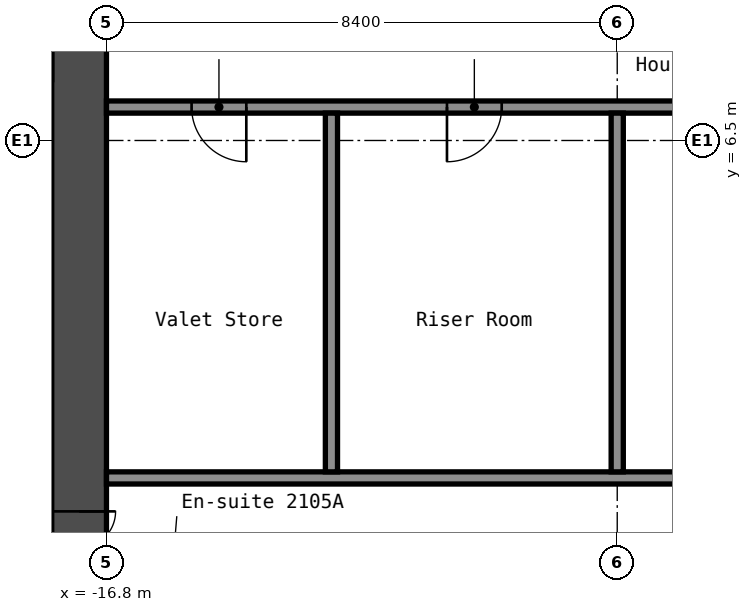
"""IFC4 building model, lengths in metres.
Left out: names, types, materials, properties, quantities, classifications, styles, units other than length and angle.
Written with IfcOpenShell. Run it as: python <this file> out.ifc"""

import sys

from ifc_helpers import new_model, si_unit, direction, frame, frame_2d, origin, place, context, subcontext, project, spatial, rectangle, extrude, element, fill, save


model = new_model("IFC4")
c1 = context("Model", 3, precision=1e-05, world=origin(), true_north=direction((0.0, 1.0)))
c2 = subcontext(c1, "Body", "Model", "MODEL_VIEW")
j1 = project(units=[si_unit("LENGTHUNIT", "METRE"), si_unit("PLANEANGLEUNIT", "RADIAN")], contexts=[c1])
p1 = place(None, origin())
s1 = spatial("IfcSite", under=j1, at=p1, CompositionType="ELEMENT")
p2 = place(p1, origin())
s2 = spatial("IfcBuilding", under=s1, at=p2, CompositionType="ELEMENT")
p3 = place(p2, frame((0.0, 0.0, 78.6)))
s3 = spatial("IfcBuildingStorey", under=s2, at=p3, CompositionType="ELEMENT", Elevation=78.6)
p4 = place(p3, frame((-17.25, -8.4, 0.0), z_axis=(0.0, 0.0, 1.0), x_axis=(0.0, 1.0, 0.0)))
e1 = element("IfcWall", 1, at=p4, inside=s3, PredefinedType="SHEAR", context=c2, shape_type="SweptSolid", body=[
    extrude(rectangle(XDim=16.8, YDim=0.9, at=frame_2d((8.4, 0.0))), origin(), (0.0, 0.0, 1.0), 2.8),
])
p5 = place(p4, frame((7.6, 0.0, 0.0)))
e2 = element("IfcOpeningElement", 2, at=p5, cuts=e1, PredefinedType="OPENING", context=c2, shape_type="SweptSolid", body=[
    extrude(rectangle(XDim=1.2, YDim=2.1, at=frame_2d((0.6, 1.05))), frame((0.0, 0.46, 0.0), z_axis=(0.0, -1.0, 0.0), x_axis=(1.0, 0.0, 0.0)), (0.0, 0.0, 1.0), 0.92),
])
p6 = place(p3, frame((-16.8, 0.95, 0.0), z_axis=(0.0, 0.0, 1.0), x_axis=(1.0, 0.0, 0.0)))
e3 = element("IfcWall", 3, at=p6, inside=s3, PredefinedType="PARTITIONING", context=c2, shape_type="SweptSolid", body=[
    extrude(rectangle(XDim=33.6, YDim=0.2, at=frame_2d((16.8, 0.0))), origin(), (0.0, 0.0, 1.0), 2.8),
])
p7 = place(p6, frame((9.88, 0.0, 0.0)))
e4 = element("IfcOpeningElement", 4, at=p7, cuts=e3, PredefinedType="OPENING", context=c2, shape_type="SweptSolid", body=[
    extrude(rectangle(XDim=0.9, YDim=2.1, at=frame_2d((0.45, 1.05))), frame((0.0, 0.11, 0.0), z_axis=(0.0, -1.0, 0.0), x_axis=(1.0, 0.0, 0.0)), (0.0, 0.0, 1.0), 0.22),
])
p8 = place(p6, frame((14.08, 0.0, 0.0)))
e5 = element("IfcOpeningElement", 5, at=p8, cuts=e3, PredefinedType="OPENING", context=c2, shape_type="SweptSolid", body=[
    extrude(rectangle(XDim=0.9, YDim=2.1, at=frame_2d((0.45, 1.05))), frame((0.0, 0.11, 0.0), z_axis=(0.0, -1.0, 0.0), x_axis=(1.0, 0.0, 0.0)), (0.0, 0.0, 1.0), 0.22),
])
p9 = place(p6, frame((26.26, 0.0, 0.0)))
e6 = element("IfcOpeningElement", 6, at=p9, cuts=e3, PredefinedType="OPENING", context=c2, shape_type="SweptSolid", body=[
    extrude(rectangle(XDim=0.9, YDim=2.1, at=frame_2d((0.45, 1.05))), frame((0.0, 0.11, 0.0), z_axis=(0.0, -1.0, 0.0), x_axis=(1.0, 0.0, 0.0)), (0.0, 0.0, 1.0), 0.22),
])
p10 = place(p6, frame((30.46, 0.0, 0.0)))
e7 = element("IfcOpeningElement", 7, at=p10, cuts=e3, PredefinedType="OPENING", context=c2, shape_type="SweptSolid", body=[
    extrude(rectangle(XDim=0.9, YDim=2.1, at=frame_2d((0.45, 1.05))), frame((0.0, 0.11, 0.0), z_axis=(0.0, -1.0, 0.0), x_axis=(1.0, 0.0, 0.0)), (0.0, 0.0, 1.0), 0.22),
])
p11 = place(p3, frame((-16.8, 7.05, 0.0), z_axis=(0.0, 0.0, 1.0), x_axis=(1.0, 0.0, 0.0)))
e8 = element("IfcWall", 8, at=p11, inside=s3, PredefinedType="PARTITIONING", context=c2, shape_type="SweptSolid", body=[
    extrude(rectangle(XDim=33.6, YDim=0.2, at=frame_2d((16.8, 0.0))), origin(), (0.0, 0.0, 1.0), 2.8),
])
p12 = place(p11, frame((1.4, 0.0, 0.0)))
e9 = element("IfcOpeningElement", 9, at=p12, cuts=e8, PredefinedType="OPENING", context=c2, shape_type="SweptSolid", body=[
    extrude(rectangle(XDim=0.9, YDim=2.1, at=frame_2d((0.45, 1.05))), frame((0.0, 0.11, 0.0), z_axis=(0.0, -1.0, 0.0), x_axis=(1.0, 0.0, 0.0)), (0.0, 0.0, 1.0), 0.22),
])
p13 = place(p11, frame((5.6, 0.0, 0.0)))
e10 = element("IfcOpeningElement", 10, at=p13, cuts=e8, PredefinedType="OPENING", context=c2, shape_type="SweptSolid", body=[
    extrude(rectangle(XDim=0.9, YDim=2.1, at=frame_2d((0.45, 1.05))), frame((0.0, 0.11, 0.0), z_axis=(0.0, -1.0, 0.0), x_axis=(1.0, 0.0, 0.0)), (0.0, 0.0, 1.0), 0.22),
])
p14 = place(p11, frame((19.04, 0.0, 0.0)))
e11 = element("IfcOpeningElement", 11, at=p14, cuts=e8, PredefinedType="OPENING", context=c2, shape_type="SweptSolid", body=[
    extrude(rectangle(XDim=0.9, YDim=2.1, at=frame_2d((0.45, 1.05))), frame((0.0, 0.11, 0.0), z_axis=(0.0, -1.0, 0.0), x_axis=(1.0, 0.0, 0.0)), (0.0, 0.0, 1.0), 0.22),
])
p15 = place(p11, frame((23.24, 0.0, 0.0)))
e12 = element("IfcOpeningElement", 12, at=p15, cuts=e8, PredefinedType="OPENING", context=c2, shape_type="SweptSolid", body=[
    extrude(rectangle(XDim=0.9, YDim=2.1, at=frame_2d((0.45, 1.05))), frame((0.0, 0.11, 0.0), z_axis=(0.0, -1.0, 0.0), x_axis=(1.0, 0.0, 0.0)), (0.0, 0.0, 1.0), 0.22),
])
for number, where, z_axis, x_axis in (
    (13, (-13.1, 1.05, 0.0), (0.0, 0.0, 1.0), (0.0, 1.0, 0.0)),
    (14, (-8.4, 1.05, 0.0), (0.0, 0.0, 1.0), (0.0, 1.0, 0.0)),
):
    element("IfcWall", number, at=place(p3, frame(where, z_axis=z_axis, x_axis=x_axis)), inside=s3, PredefinedType="PARTITIONING", context=c2, shape_type="SweptSolid", body=[
        extrude(rectangle(XDim=5.9, YDim=0.2, at=frame_2d((2.95, 0.0))), origin(), (0.0, 0.0, 1.0), 2.8),
    ])
p16 = place(p5, origin())
e15 = element("IfcDoor", 15, at=p16, inside=s3, OperationType="DOUBLE_DOOR_SINGLE_SWING", PredefinedType="DOOR", context=c2, shape_type="SweptSolid", body=[
    extrude(rectangle(XDim=1.2, YDim=2.1, at=frame_2d((0.6, 1.05))), frame((0.0, 0.025, 0.0), z_axis=(0.0, -1.0, 0.0), x_axis=(1.0, 0.0, 0.0)), (0.0, 0.0, 1.0), 0.05),
])
fill(e2, e15)
p17 = place(p12, origin())
e16 = element("IfcDoor", 16, at=p17, inside=s3, OperationType="SINGLE_SWING_RIGHT", PredefinedType="DOOR", context=c2, shape_type="SweptSolid", body=[
    extrude(rectangle(XDim=0.9, YDim=2.1, at=frame_2d((0.45, 1.05))), frame((0.0, 0.025, 0.0), z_axis=(0.0, -1.0, 0.0), x_axis=(1.0, 0.0, 0.0)), (0.0, 0.0, 1.0), 0.05),
])
fill(e9, e16)
p18 = place(p13, origin())
e17 = element("IfcDoor", 17, at=p18, inside=s3, OperationType="SINGLE_SWING_LEFT", PredefinedType="DOOR", context=c2, shape_type="SweptSolid", body=[
    extrude(rectangle(XDim=0.9, YDim=2.1, at=frame_2d((0.45, 1.05))), frame((0.0, 0.025, 0.0), z_axis=(0.0, -1.0, 0.0), x_axis=(1.0, 0.0, 0.0)), (0.0, 0.0, 1.0), 0.05),
])
fill(e10, e17)
save(model, sys.argv[1])
